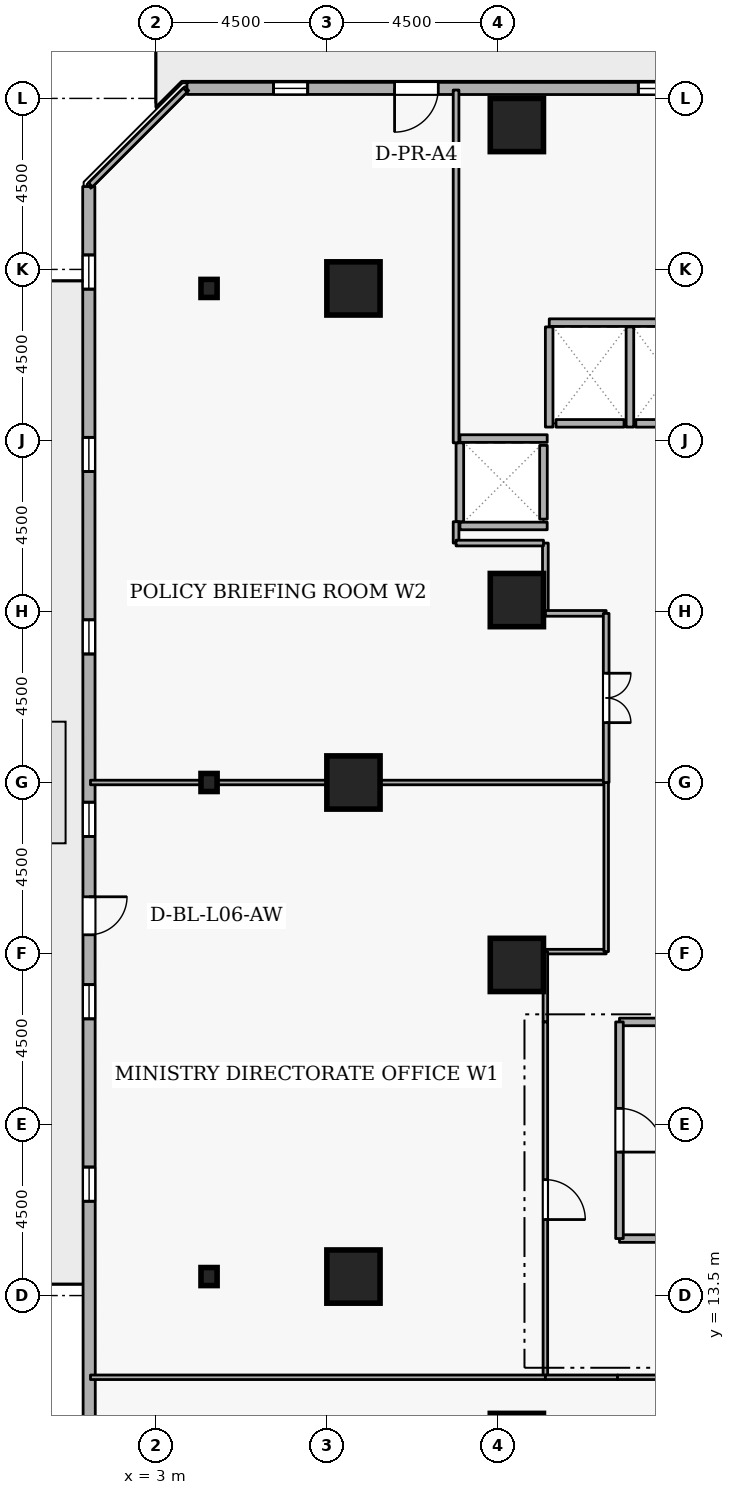
"""IFC4 building model, lengths in metres.
Left out: names, types, materials, properties, quantities, classifications, styles, units other than length and angle.
Written with IfcOpenShell. Run it as: python <this file> out.ifc"""

import sys

from ifc_helpers import new_model, si_unit, direction, frame, frame_2d, origin, origin_2d, place, context, subcontext, project, spatial, rectangle, i_section, extrude, element, fill, save


model = new_model("IFC4")
c1 = context("Model", 3, precision=1e-05, world=origin(), true_north=direction((0.0, 1.0)))
c2 = subcontext(c1, "Body", "Model", "MODEL_VIEW")
j1 = project(units=[si_unit("LENGTHUNIT", "METRE"), si_unit("PLANEANGLEUNIT", "RADIAN")], contexts=[c1])
p1 = place(None, origin())
s1 = spatial("IfcSite", under=j1, at=p1, CompositionType="ELEMENT")
p2 = place(p1, origin())
s2 = spatial("IfcBuilding", under=s1, at=p2, CompositionType="ELEMENT")
p3 = place(p2, frame((0.0, 0.0, 27.9)))
s3 = spatial("IfcBuildingStorey", under=s2, at=p3, CompositionType="ELEMENT", Elevation=27.9)
for number, where, z_axis, x_axis in (
    (1, (12.5, 9.7, 0.0), (0.0, 0.0, 1.0), (1.0, 0.0, 0.0)),
    (2, (12.5, 44.3, 0.0), (0.0, 0.0, 1.0), (1.0, 0.0, 0.0)),
    (3, (8.2, 14.0, 0.0), (0.0, 0.0, 1.0), (1.0, 0.0, 0.0)),
    (4, (8.2, 27.0, 0.0), (0.0, 0.0, 1.0), (1.0, 0.0, 0.0)),
    (5, (8.2, 40.0, 0.0), (0.0, 0.0, 1.0), (1.0, 0.0, 0.0)),
    (6, (12.5, 22.2, 0.0), (0.0, 0.0, 1.0), (1.0, 0.0, 0.0)),
    (7, (12.5, 31.8, 0.0), (0.0, 0.0, 1.0), (1.0, 0.0, 0.0)),
):
    element("IfcColumn", number, at=place(p3, frame(where, z_axis=z_axis, x_axis=x_axis)), inside=s3, PredefinedType="COLUMN", context=c2, shape_type="SweptSolid", body=[
        extrude(rectangle(XDim=1.4, YDim=1.4, at=origin_2d()), origin(), (0.0, 0.0, 1.0), 3.6),
    ])
for number, where, z_axis, x_axis in (
    (8, (4.4, 14.0, 0.0), (0.0, 0.0, 1.0), (1.0, 0.0, 0.0)),
    (9, (4.4, 27.0, 0.0), (0.0, 0.0, 1.0), (1.0, 0.0, 0.0)),
    (10, (4.4, 40.0, 0.0), (0.0, 0.0, 1.0), (1.0, 0.0, 0.0)),
):
    element("IfcColumn", number, at=place(p3, frame(where, z_axis=z_axis, x_axis=x_axis)), inside=s3, PredefinedType="COLUMN", context=c2, shape_type="SweptSolid", body=[
        extrude(i_section(OverallWidth=0.424, OverallDepth=0.475, WebThickness=0.048, FlangeThickness=0.077, FilletRadius=0.015, at=origin_2d()), origin(), (0.0, 0.0, 1.0), 3.6),
    ])
p4 = place(p3, frame((37.596, 45.253, 0.0), z_axis=(0.0, 0.0, 1.0), x_axis=(-0.999999942296, 0.000339718087, 0.0)))
e11 = element("IfcWall", 11, at=p4, inside=s3, PredefinedType="STANDARD", context=c2, shape_type="SweptSolid", body=[
    extrude(rectangle(XDim=33.777, YDim=0.32, at=frame_2d((16.888, 0.0))), origin(), (0.0, 0.0, 1.0), 2.7),
])
p5 = place(p4, frame((27.164, 0.0, 0.0)))
e12 = element("IfcOpeningElement", 12, at=p5, cuts=e11, PredefinedType="OPENING", context=c2, shape_type="SweptSolid", body=[
    extrude(rectangle(XDim=1.15, YDim=2.1, at=frame_2d((0.575, 1.05))), frame((0.0, 0.17, 0.0), z_axis=(0.0, -1.0, 0.0), x_axis=(1.0, 0.0, 0.0)), (0.0, 0.0, 1.0), 0.34),
])
p6 = place(p4, frame((6.6, 0.0, 0.72)))
e13 = element("IfcOpeningElement", 13, at=p6, cuts=e11, PredefinedType="OPENING", context=c2, shape_type="SweptSolid", body=[
    extrude(rectangle(XDim=0.9, YDim=1.75, at=frame_2d((0.45, 0.875))), frame((0.0, 0.17, 0.0), z_axis=(0.0, -1.0, 0.0), x_axis=(1.0, 0.0, 0.0)), (0.0, 0.0, 1.0), 0.34),
])
p7 = place(p4, frame((16.2, 0.0, 0.72)))
e14 = element("IfcOpeningElement", 14, at=p7, cuts=e11, PredefinedType="OPENING", context=c2, shape_type="SweptSolid", body=[
    extrude(rectangle(XDim=0.9, YDim=1.75, at=frame_2d((0.45, 0.875))), frame((0.0, 0.17, 0.0), z_axis=(0.0, -1.0, 0.0), x_axis=(1.0, 0.0, 0.0)), (0.0, 0.0, 1.0), 0.34),
])
p8 = place(p4, frame((21.0, 0.0, 0.72)))
e15 = element("IfcOpeningElement", 15, at=p8, cuts=e11, PredefinedType="OPENING", context=c2, shape_type="SweptSolid", body=[
    extrude(rectangle(XDim=0.9, YDim=1.75, at=frame_2d((0.45, 0.875))), frame((0.0, 0.17, 0.0), z_axis=(0.0, -1.0, 0.0), x_axis=(1.0, 0.0, 0.0)), (0.0, 0.0, 1.0), 0.34),
])
p9 = place(p4, frame((30.6, 0.0, 0.72)))
e16 = element("IfcOpeningElement", 16, at=p9, cuts=e11, PredefinedType="OPENING", context=c2, shape_type="SweptSolid", body=[
    extrude(rectangle(XDim=0.9, YDim=1.75, at=frame_2d((0.45, 0.875))), frame((0.0, 0.17, 0.0), z_axis=(0.0, -1.0, 0.0), x_axis=(1.0, 0.0, 0.0)), (0.0, 0.0, 1.0), 0.34),
])
p10 = place(p3, frame((1.235, 42.681, 0.0), z_axis=(0.0, 0.0, 1.0), x_axis=(0.000339718087, -0.999999942296, 0.0)))
e17 = element("IfcWall", 17, at=p10, inside=s3, PredefinedType="STANDARD", context=c2, shape_type="SweptSolid", body=[
    extrude(rectangle(XDim=33.777, YDim=0.32, at=frame_2d((16.888, 0.0))), origin(), (0.0, 0.0, 1.0), 2.7),
])
p11 = place(p10, frame((18.688, 0.0, 0.0)))
e18 = element("IfcOpeningElement", 18, at=p11, cuts=e17, PredefinedType="OPENING", context=c2, shape_type="SweptSolid", body=[
    extrude(rectangle(XDim=1.0, YDim=2.08, at=frame_2d((0.5, 1.04))), frame((0.0, 0.17, 0.0), z_axis=(0.0, -1.0, 0.0), x_axis=(1.0, 0.0, 0.0)), (0.0, 0.0, 1.0), 0.34),
])
p12 = place(p10, frame((1.8, 0.0, 0.72)))
e19 = element("IfcOpeningElement", 19, at=p12, cuts=e17, PredefinedType="OPENING", context=c2, shape_type="SweptSolid", body=[
    extrude(rectangle(XDim=0.9, YDim=1.75, at=frame_2d((0.45, 0.875))), frame((0.0, 0.17, 0.0), z_axis=(0.0, -1.0, 0.0), x_axis=(1.0, 0.0, 0.0)), (0.0, 0.0, 1.0), 0.34),
])
p13 = place(p10, frame((6.6, 0.0, 0.72)))
e20 = element("IfcOpeningElement", 20, at=p13, cuts=e17, PredefinedType="OPENING", context=c2, shape_type="SweptSolid", body=[
    extrude(rectangle(XDim=0.9, YDim=1.75, at=frame_2d((0.45, 0.875))), frame((0.0, 0.17, 0.0), z_axis=(0.0, -1.0, 0.0), x_axis=(1.0, 0.0, 0.0)), (0.0, 0.0, 1.0), 0.34),
])
p14 = place(p10, frame((11.4, 0.0, 0.72)))
e21 = element("IfcOpeningElement", 21, at=p14, cuts=e17, PredefinedType="OPENING", context=c2, shape_type="SweptSolid", body=[
    extrude(rectangle(XDim=0.9, YDim=1.75, at=frame_2d((0.45, 0.875))), frame((0.0, 0.17, 0.0), z_axis=(0.0, -1.0, 0.0), x_axis=(1.0, 0.0, 0.0)), (0.0, 0.0, 1.0), 0.34),
])
p15 = place(p10, frame((16.2, 0.0, 0.72)))
e22 = element("IfcOpeningElement", 22, at=p15, cuts=e17, PredefinedType="OPENING", context=c2, shape_type="SweptSolid", body=[
    extrude(rectangle(XDim=0.9, YDim=1.75, at=frame_2d((0.45, 0.875))), frame((0.0, 0.17, 0.0), z_axis=(0.0, -1.0, 0.0), x_axis=(1.0, 0.0, 0.0)), (0.0, 0.0, 1.0), 0.34),
])
p16 = place(p10, frame((21.0, 0.0, 0.72)))
e23 = element("IfcOpeningElement", 23, at=p16, cuts=e17, PredefinedType="OPENING", context=c2, shape_type="SweptSolid", body=[
    extrude(rectangle(XDim=0.9, YDim=1.75, at=frame_2d((0.45, 0.875))), frame((0.0, 0.17, 0.0), z_axis=(0.0, -1.0, 0.0), x_axis=(1.0, 0.0, 0.0)), (0.0, 0.0, 1.0), 0.34),
])
p17 = place(p10, frame((25.8, 0.0, 0.72)))
e24 = element("IfcOpeningElement", 24, at=p17, cuts=e17, PredefinedType="OPENING", context=c2, shape_type="SweptSolid", body=[
    extrude(rectangle(XDim=0.9, YDim=1.75, at=frame_2d((0.45, 0.875))), frame((0.0, 0.17, 0.0), z_axis=(0.0, -1.0, 0.0), x_axis=(1.0, 0.0, 0.0)), (0.0, 0.0, 1.0), 0.34),
])
p18 = place(p3, frame((17.37, 36.45, 0.0), z_axis=(0.0, 0.0, 1.0), x_axis=(-1.0, 0.0, 0.0)))
e25 = element("IfcWall", 25, at=p18, inside=s3, PredefinedType="STANDARD", context=c2, shape_type="SweptSolid", body=[
    extrude(rectangle(XDim=1.74, YDim=0.2, at=frame_2d((0.87, 0.0))), origin(), (0.0, 0.0, 1.0), 3.34),
])
p19 = place(p3, frame((15.32, 36.45, 0.0), z_axis=(0.0, 0.0, 1.0), x_axis=(-1.0, 0.0, 0.0)))
e26 = element("IfcWall", 26, at=p19, inside=s3, PredefinedType="STANDARD", context=c2, shape_type="SweptSolid", body=[
    extrude(rectangle(XDim=1.79, YDim=0.2, at=frame_2d((0.895, 0.0))), origin(), (0.0, 0.0, 1.0), 3.34),
])
p20 = place(p3, frame((13.2, 33.93, 0.0), z_axis=(0.0, 0.0, 1.0), x_axis=(0.0, 1.0, 0.0)))
e27 = element("IfcWall", 27, at=p20, inside=s3, PredefinedType="STANDARD", context=c2, shape_type="SweptSolid", body=[
    extrude(rectangle(XDim=1.94, YDim=0.2, at=frame_2d((0.97, 0.0))), origin(), (0.0, 0.0, 1.0), 3.34),
])
p21 = place(p3, frame((13.352, 39.1, 0.0), z_axis=(0.0, 0.0, 1.0), x_axis=(1.0, 0.0, 0.0)))
e28 = element("IfcWall", 28, at=p21, inside=s3, PredefinedType="STANDARD", context=c2, shape_type="SweptSolid", body=[
    extrude(rectangle(XDim=4.196, YDim=0.2, at=frame_2d((2.098, 0.0))), origin(), (0.0, 0.0, 1.0), 3.34),
])
for number, where, z_axis, x_axis in (
    (29, (15.475, 36.352, 0.0), (0.0, 0.0, 1.0), (0.0, 1.0, 0.0)),
    (30, (13.35, 36.352, 0.0), (0.0, 0.0, 1.0), (0.0, 1.0, 0.0)),
):
    element("IfcWall", number, at=place(p3, frame(where, z_axis=z_axis, x_axis=x_axis)), inside=s3, PredefinedType="STANDARD", context=c2, shape_type="SweptSolid", body=[
        extrude(rectangle(XDim=2.636, YDim=0.2, at=frame_2d((1.318, 0.0))), origin(), (0.0, 0.0, 1.0), 3.34),
    ])
for number, where, z_axis, x_axis in (
    (31, (11.002, 36.05, 0.0), (0.0, 0.0, 1.0), (1.0, 0.0, 0.0)),
    (32, (11.002, 33.75, 0.0), (0.0, 0.0, 1.0), (1.0, 0.0, 0.0)),
):
    element("IfcWall", number, at=place(p3, frame(where, z_axis=z_axis, x_axis=x_axis)), inside=s3, PredefinedType="STANDARD", context=c2, shape_type="SweptSolid", body=[
        extrude(rectangle(XDim=2.296, YDim=0.2, at=frame_2d((1.148, 0.0))), origin(), (0.0, 0.0, 1.0), 3.34),
    ])
p22 = place(p3, frame((11.0, 33.862, 0.0), z_axis=(0.0, 0.0, 1.0), x_axis=(0.0, 1.0, 0.0)))
e33 = element("IfcWall", 33, at=p22, inside=s3, PredefinedType="STANDARD", context=c2, shape_type="SweptSolid", body=[
    extrude(rectangle(XDim=2.076, YDim=0.2, at=frame_2d((1.038, 0.0))), origin(), (0.0, 0.0, 1.0), 3.34),
])
for number, where, z_axis, x_axis in (
    (34, (15.2, 15.0, 0.0), (0.0, 0.0, 1.0), (1.0, 0.0, 0.0)),
    (35, (17.7, 20.7, 0.0), (0.0, 0.0, 1.0), (-1.0, 0.0, 0.0)),
):
    element("IfcWall", number, at=place(p3, frame(where, z_axis=z_axis, x_axis=x_axis)), inside=s3, PredefinedType="STANDARD", context=c2, shape_type="SweptSolid", body=[
        extrude(rectangle(XDim=2.5, YDim=0.2, at=frame_2d((1.25, 0.0))), origin(), (0.0, 0.0, 1.0), 3.34),
    ])
p23 = place(p3, frame((15.2, 20.7, 0.0), z_axis=(0.0, 0.0, 1.0), x_axis=(0.0, -1.0, 0.0)))
e36 = element("IfcWall", 36, at=p23, inside=s3, PredefinedType="STANDARD", context=c2, shape_type="SweptSolid", body=[
    extrude(rectangle(XDim=5.7, YDim=0.2, at=frame_2d((2.85, 0.0))), origin(), (0.0, 0.0, 1.0), 3.34),
])
p24 = place(p23, frame((2.275, 0.0, 0.0)))
e37 = element("IfcOpeningElement", 37, at=p24, cuts=e36, PredefinedType="OPENING", context=c2, shape_type="SweptSolid", body=[
    extrude(rectangle(XDim=1.15, YDim=2.1, at=frame_2d((0.575, 1.05))), frame((0.0, 0.11, 0.0), z_axis=(0.0, -1.0, 0.0), x_axis=(1.0, 0.0, 0.0)), (0.0, 0.0, 1.0), 0.22),
])
p25 = place(p3, frame((14.85, 22.55, 0.0), z_axis=(0.0, 0.0, 1.0), x_axis=(-1.0, 0.0, 0.0)))
e38 = element("IfcWall", 38, at=p25, inside=s3, PredefinedType="PARTITIONING", context=c2, shape_type="SweptSolid", body=[
    extrude(rectangle(XDim=1.6, YDim=0.12, at=frame_2d((0.8, 0.0))), origin(), (0.0, 0.0, 1.0), 3.34),
])
p26 = place(p3, frame((13.25, 22.55, 0.0), z_axis=(0.0, 0.0, 1.0), x_axis=(0.0, -1.0, 0.0)))
e39 = element("IfcWall", 39, at=p26, inside=s3, PredefinedType="PARTITIONING", context=c2, shape_type="SweptSolid", body=[
    extrude(rectangle(XDim=1.85, YDim=0.12, at=frame_2d((0.925, 0.0))), origin(), (0.0, 0.0, 1.0), 3.34),
])
p27 = place(p3, frame((13.25, 20.7, 0.0), z_axis=(0.0, 0.0, 1.0), x_axis=(0.0, -1.0, 0.0)))
e40 = element("IfcWall", 40, at=p27, inside=s3, PredefinedType="PARTITIONING", context=c2, shape_type="SweptSolid", body=[
    extrude(rectangle(XDim=9.35, YDim=0.12, at=frame_2d((4.675, 0.0))), origin(), (0.0, 0.0, 1.0), 3.34),
])
p28 = place(p27, frame((4.15, 0.0, 0.0)))
e41 = element("IfcOpeningElement", 41, at=p28, cuts=e40, PredefinedType="OPENING", context=c2, shape_type="SweptSolid", body=[
    extrude(rectangle(XDim=1.05, YDim=2.1, at=frame_2d((0.525, 1.05))), frame((0.0, 0.07, 0.0), z_axis=(0.0, -1.0, 0.0), x_axis=(1.0, 0.0, 0.0)), (0.0, 0.0, 1.0), 0.14),
])
p29 = place(p3, frame((13.25, 11.35, 0.0), z_axis=(0.0, 0.0, 1.0), x_axis=(-1.0, 0.0, 0.0)))
e42 = element("IfcWall", 42, at=p29, inside=s3, PredefinedType="PARTITIONING", context=c2, shape_type="SweptSolid", body=[
    extrude(rectangle(XDim=11.97, YDim=0.12, at=frame_2d((5.985, 0.0))), origin(), (0.0, 0.0, 1.0), 3.34),
])
p30 = place(p3, frame((1.28, 27.0, 0.0), z_axis=(0.0, 0.0, 1.0), x_axis=(1.0, 0.0, 0.0)))
e43 = element("IfcWall", 43, at=p30, inside=s3, PredefinedType="PARTITIONING", context=c2, shape_type="SweptSolid", body=[
    extrude(rectangle(XDim=13.57, YDim=0.12, at=frame_2d((6.785, 0.0))), origin(), (0.0, 0.0, 1.0), 2.878),
])
p31 = place(p3, frame((14.85, 27.0, 0.0), z_axis=(0.0, 0.0, 1.0), x_axis=(0.0, -1.0, 0.0)))
e44 = element("IfcWall", 44, at=p31, inside=s3, PredefinedType="PARTITIONING", context=c2, shape_type="SweptSolid", body=[
    extrude(rectangle(XDim=4.45, YDim=0.12, at=frame_2d((2.225, 0.0))), origin(), (0.0, 0.0, 1.0), 3.34),
])
p32 = place(p3, frame((13.25, 33.3, 0.0), z_axis=(0.0, 0.0, 1.0), x_axis=(0.0, -1.0, 0.0)))
e45 = element("IfcWall", 45, at=p32, inside=s3, PredefinedType="PARTITIONING", context=c2, shape_type="SweptSolid", body=[
    extrude(rectangle(XDim=1.85, YDim=0.15, at=frame_2d((0.925, 0.0))), origin(), (0.0, 0.0, 1.0), 3.34),
])
p33 = place(p3, frame((13.25, 31.45, 0.0), z_axis=(0.0, 0.0, 1.0), x_axis=(1.0, 0.0, 0.0)))
e46 = element("IfcWall", 46, at=p33, inside=s3, PredefinedType="PARTITIONING", context=c2, shape_type="SweptSolid", body=[
    extrude(rectangle(XDim=1.6, YDim=0.15, at=frame_2d((0.8, 0.0))), origin(), (0.0, 0.0, 1.0), 3.34),
])
p34 = place(p3, frame((14.85, 31.45, 0.0), z_axis=(0.0, 0.0, 1.0), x_axis=(0.0, -1.0, 0.0)))
e47 = element("IfcWall", 47, at=p34, inside=s3, PredefinedType="PARTITIONING", context=c2, shape_type="SweptSolid", body=[
    extrude(rectangle(XDim=4.45, YDim=0.15, at=frame_2d((2.225, 0.0))), origin(), (0.0, 0.0, 1.0), 3.34),
])
p35 = place(p34, frame((1.575, 0.0, 0.0)))
e48 = element("IfcOpeningElement", 48, at=p35, cuts=e47, PredefinedType="OPENING", context=c2, shape_type="SweptSolid", body=[
    extrude(rectangle(XDim=1.3, YDim=2.12, at=frame_2d((0.65, 1.06))), frame((0.0, 0.085, 0.0), z_axis=(0.0, -1.0, 0.0), x_axis=(1.0, 0.0, 0.0)), (0.0, 0.0, 1.0), 0.17),
])
p36 = place(p3, frame((1.28, 42.725, 0.0), z_axis=(0.0, 0.0, 1.0), x_axis=(0.707106781187, 0.707106781187, 0.0)))
e49 = element("IfcWall", 49, at=p36, inside=s3, PredefinedType="PARTITIONING", context=c2, shape_type="SweptSolid", body=[
    extrude(rectangle(XDim=3.528, YDim=0.15, at=frame_2d((1.764, 0.0))), origin(), (0.0, 0.0, 1.0), 3.34),
])
p37 = place(p3, frame((10.9, 45.22, 0.0), z_axis=(0.0, 0.0, 1.0), x_axis=(0.0, -1.0, 0.0)))
e50 = element("IfcWall", 50, at=p37, inside=s3, PredefinedType="PARTITIONING", context=c2, shape_type="SweptSolid", body=[
    extrude(rectangle(XDim=9.282, YDim=0.15, at=frame_2d((4.641, 0.0))), origin(), (0.0, 0.0, 1.0), 3.34),
])
p38 = place(p3, frame((10.9, 33.862, 0.0), z_axis=(0.0, 0.0, 1.0), x_axis=(0.0, -1.0, 0.0)))
e51 = element("IfcWall", 51, at=p38, inside=s3, PredefinedType="PARTITIONING", context=c2, shape_type="SweptSolid", body=[
    extrude(rectangle(XDim=0.562, YDim=0.15, at=frame_2d((0.281, 0.0))), origin(), (0.0, 0.0, 1.0), 3.34),
])
p39 = place(p3, frame((10.9, 33.3, 0.0), z_axis=(0.0, 0.0, 1.0), x_axis=(1.0, 0.0, 0.0)))
e52 = element("IfcWall", 52, at=p39, inside=s3, PredefinedType="PARTITIONING", context=c2, shape_type="SweptSolid", body=[
    extrude(rectangle(XDim=2.3, YDim=0.15, at=frame_2d((1.15, 0.0))), origin(), (0.0, 0.0, 1.0), 3.34),
])
p40 = place(p3, frame((13.25, 11.35, 0.0), z_axis=(0.0, 0.0, 1.0), x_axis=(1.0, 0.0, 0.0)))
e53 = element("IfcWall", 53, at=p40, inside=s3, PredefinedType="PARTITIONING", context=c2, shape_type="SweptSolid", body=[
    extrude(rectangle(XDim=1.9, YDim=0.12, at=frame_2d((0.95, 0.0))), origin(), (0.0, 0.0, 1.0), 3.34),
])
p41 = place(p3, frame((15.15, 11.35, 0.0), z_axis=(0.0, 0.0, 1.0), x_axis=(1.0, 0.0, 0.0)))
e54 = element("IfcWall", 54, at=p41, inside=s3, PredefinedType="PARTITIONING", context=c2, shape_type="SweptSolid", body=[
    extrude(rectangle(XDim=10.35, YDim=0.12, at=frame_2d((5.175, 0.0))), origin(), (0.0, 0.0, 1.0), 3.34),
])
p42 = place(p41, frame((4.65, 0.0, 0.0)))
e55 = element("IfcOpeningElement", 55, at=p42, cuts=e54, PredefinedType="OPENING", context=c2, shape_type="SweptSolid", body=[
    extrude(rectangle(XDim=1.05, YDim=2.1, at=frame_2d((0.525, 1.05))), frame((0.0, 0.07, 0.0), z_axis=(0.0, -1.0, 0.0), x_axis=(1.0, 0.0, 0.0)), (0.0, 0.0, 1.0), 0.14),
])
p43 = place(p5, origin())
e56 = element("IfcDoor", 56, at=p43, inside=s3, OperationType="SINGLE_SWING_RIGHT", PredefinedType="DOOR", context=c2, shape_type="SweptSolid", body=[
    extrude(rectangle(XDim=1.15, YDim=2.1, at=frame_2d((0.575, 1.05))), frame((0.0, 0.025, 0.0), z_axis=(0.0, -1.0, 0.0), x_axis=(1.0, 0.0, 0.0)), (0.0, 0.0, 1.0), 0.05),
])
fill(e12, e56)
p44 = place(p8, origin())
e57 = element("IfcWindow", 57, at=p44, inside=s3, PartitioningType="SINGLE_PANEL", PredefinedType="WINDOW", context=c2, shape_type="SweptSolid", body=[
    extrude(rectangle(XDim=0.9, YDim=1.75, at=frame_2d((0.45, 0.875))), frame((0.0, 0.03, 0.0), z_axis=(0.0, -1.0, 0.0), x_axis=(1.0, 0.0, 0.0)), (0.0, 0.0, 1.0), 0.06),
])
fill(e15, e57)
p45 = place(p9, origin())
e58 = element("IfcWindow", 58, at=p45, inside=s3, PartitioningType="SINGLE_PANEL", PredefinedType="WINDOW", context=c2, shape_type="SweptSolid", body=[
    extrude(rectangle(XDim=0.9, YDim=1.75, at=frame_2d((0.45, 0.875))), frame((0.0, 0.03, 0.0), z_axis=(0.0, -1.0, 0.0), x_axis=(1.0, 0.0, 0.0)), (0.0, 0.0, 1.0), 0.06),
])
fill(e16, e58)
p46 = place(p11, origin())
e59 = element("IfcDoor", 59, at=p46, inside=s3, OperationType="SINGLE_SWING_LEFT", PredefinedType="DOOR", context=c2, shape_type="SweptSolid", body=[
    extrude(rectangle(XDim=1.0, YDim=2.08, at=frame_2d((0.5, 1.04))), frame((0.0, 0.025, 0.0), z_axis=(0.0, -1.0, 0.0), x_axis=(1.0, 0.0, 0.0)), (0.0, 0.0, 1.0), 0.05),
])
fill(e18, e59)
p47 = place(p12, origin())
e60 = element("IfcWindow", 60, at=p47, inside=s3, PartitioningType="SINGLE_PANEL", PredefinedType="WINDOW", context=c2, shape_type="SweptSolid", body=[
    extrude(rectangle(XDim=0.9, YDim=1.75, at=frame_2d((0.45, 0.875))), frame((0.0, 0.03, 0.0), z_axis=(0.0, -1.0, 0.0), x_axis=(1.0, 0.0, 0.0)), (0.0, 0.0, 1.0), 0.06),
])
fill(e19, e60)
p48 = place(p13, origin())
e61 = element("IfcWindow", 61, at=p48, inside=s3, PartitioningType="SINGLE_PANEL", PredefinedType="WINDOW", context=c2, shape_type="SweptSolid", body=[
    extrude(rectangle(XDim=0.9, YDim=1.75, at=frame_2d((0.45, 0.875))), frame((0.0, 0.03, 0.0), z_axis=(0.0, -1.0, 0.0), x_axis=(1.0, 0.0, 0.0)), (0.0, 0.0, 1.0), 0.06),
])
fill(e20, e61)
p49 = place(p14, origin())
e62 = element("IfcWindow", 62, at=p49, inside=s3, PartitioningType="SINGLE_PANEL", PredefinedType="WINDOW", context=c2, shape_type="SweptSolid", body=[
    extrude(rectangle(XDim=0.9, YDim=1.75, at=frame_2d((0.45, 0.875))), frame((0.0, 0.03, 0.0), z_axis=(0.0, -1.0, 0.0), x_axis=(1.0, 0.0, 0.0)), (0.0, 0.0, 1.0), 0.06),
])
fill(e21, e62)
p50 = place(p15, origin())
e63 = element("IfcWindow", 63, at=p50, inside=s3, PartitioningType="SINGLE_PANEL", PredefinedType="WINDOW", context=c2, shape_type="SweptSolid", body=[
    extrude(rectangle(XDim=0.9, YDim=1.75, at=frame_2d((0.45, 0.875))), frame((0.0, 0.03, 0.0), z_axis=(0.0, -1.0, 0.0), x_axis=(1.0, 0.0, 0.0)), (0.0, 0.0, 1.0), 0.06),
])
fill(e22, e63)
p51 = place(p16, origin())
e64 = element("IfcWindow", 64, at=p51, inside=s3, PartitioningType="SINGLE_PANEL", PredefinedType="WINDOW", context=c2, shape_type="SweptSolid", body=[
    extrude(rectangle(XDim=0.9, YDim=1.75, at=frame_2d((0.45, 0.875))), frame((0.0, 0.03, 0.0), z_axis=(0.0, -1.0, 0.0), x_axis=(1.0, 0.0, 0.0)), (0.0, 0.0, 1.0), 0.06),
])
fill(e23, e64)
p52 = place(p17, origin())
e65 = element("IfcWindow", 65, at=p52, inside=s3, PartitioningType="SINGLE_PANEL", PredefinedType="WINDOW", context=c2, shape_type="SweptSolid", body=[
    extrude(rectangle(XDim=0.9, YDim=1.75, at=frame_2d((0.45, 0.875))), frame((0.0, 0.03, 0.0), z_axis=(0.0, -1.0, 0.0), x_axis=(1.0, 0.0, 0.0)), (0.0, 0.0, 1.0), 0.06),
])
fill(e24, e65)
p53 = place(p24, origin())
e66 = element("IfcDoor", 66, at=p53, inside=s3, OperationType="SINGLE_SWING_RIGHT", PredefinedType="DOOR", context=c2, shape_type="SweptSolid", body=[
    extrude(rectangle(XDim=1.15, YDim=2.1, at=frame_2d((0.575, 1.05))), frame((0.0, 0.025, 0.0), z_axis=(0.0, -1.0, 0.0), x_axis=(1.0, 0.0, 0.0)), (0.0, 0.0, 1.0), 0.05),
])
fill(e37, e66)
p54 = place(p28, origin())
e67 = element("IfcDoor", 67, at=p54, inside=s3, OperationType="SINGLE_SWING_RIGHT", PredefinedType="DOOR", context=c2, shape_type="SweptSolid", body=[
    extrude(rectangle(XDim=1.05, YDim=2.1, at=frame_2d((0.525, 1.05))), frame((0.0, 0.025, 0.0), z_axis=(0.0, -1.0, 0.0), x_axis=(1.0, 0.0, 0.0)), (0.0, 0.0, 1.0), 0.05),
])
fill(e41, e67)
p55 = place(p35, origin())
e68 = element("IfcDoor", 68, at=p55, inside=s3, OperationType="DOUBLE_DOOR_SINGLE_SWING", PredefinedType="DOOR", context=c2, shape_type="SweptSolid", body=[
    extrude(rectangle(XDim=1.3, YDim=2.12, at=frame_2d((0.65, 1.06))), frame((0.0, 0.025, 0.0), z_axis=(0.0, -1.0, 0.0), x_axis=(1.0, 0.0, 0.0)), (0.0, 0.0, 1.0), 0.05),
])
fill(e48, e68)
save(model, sys.argv[1])
